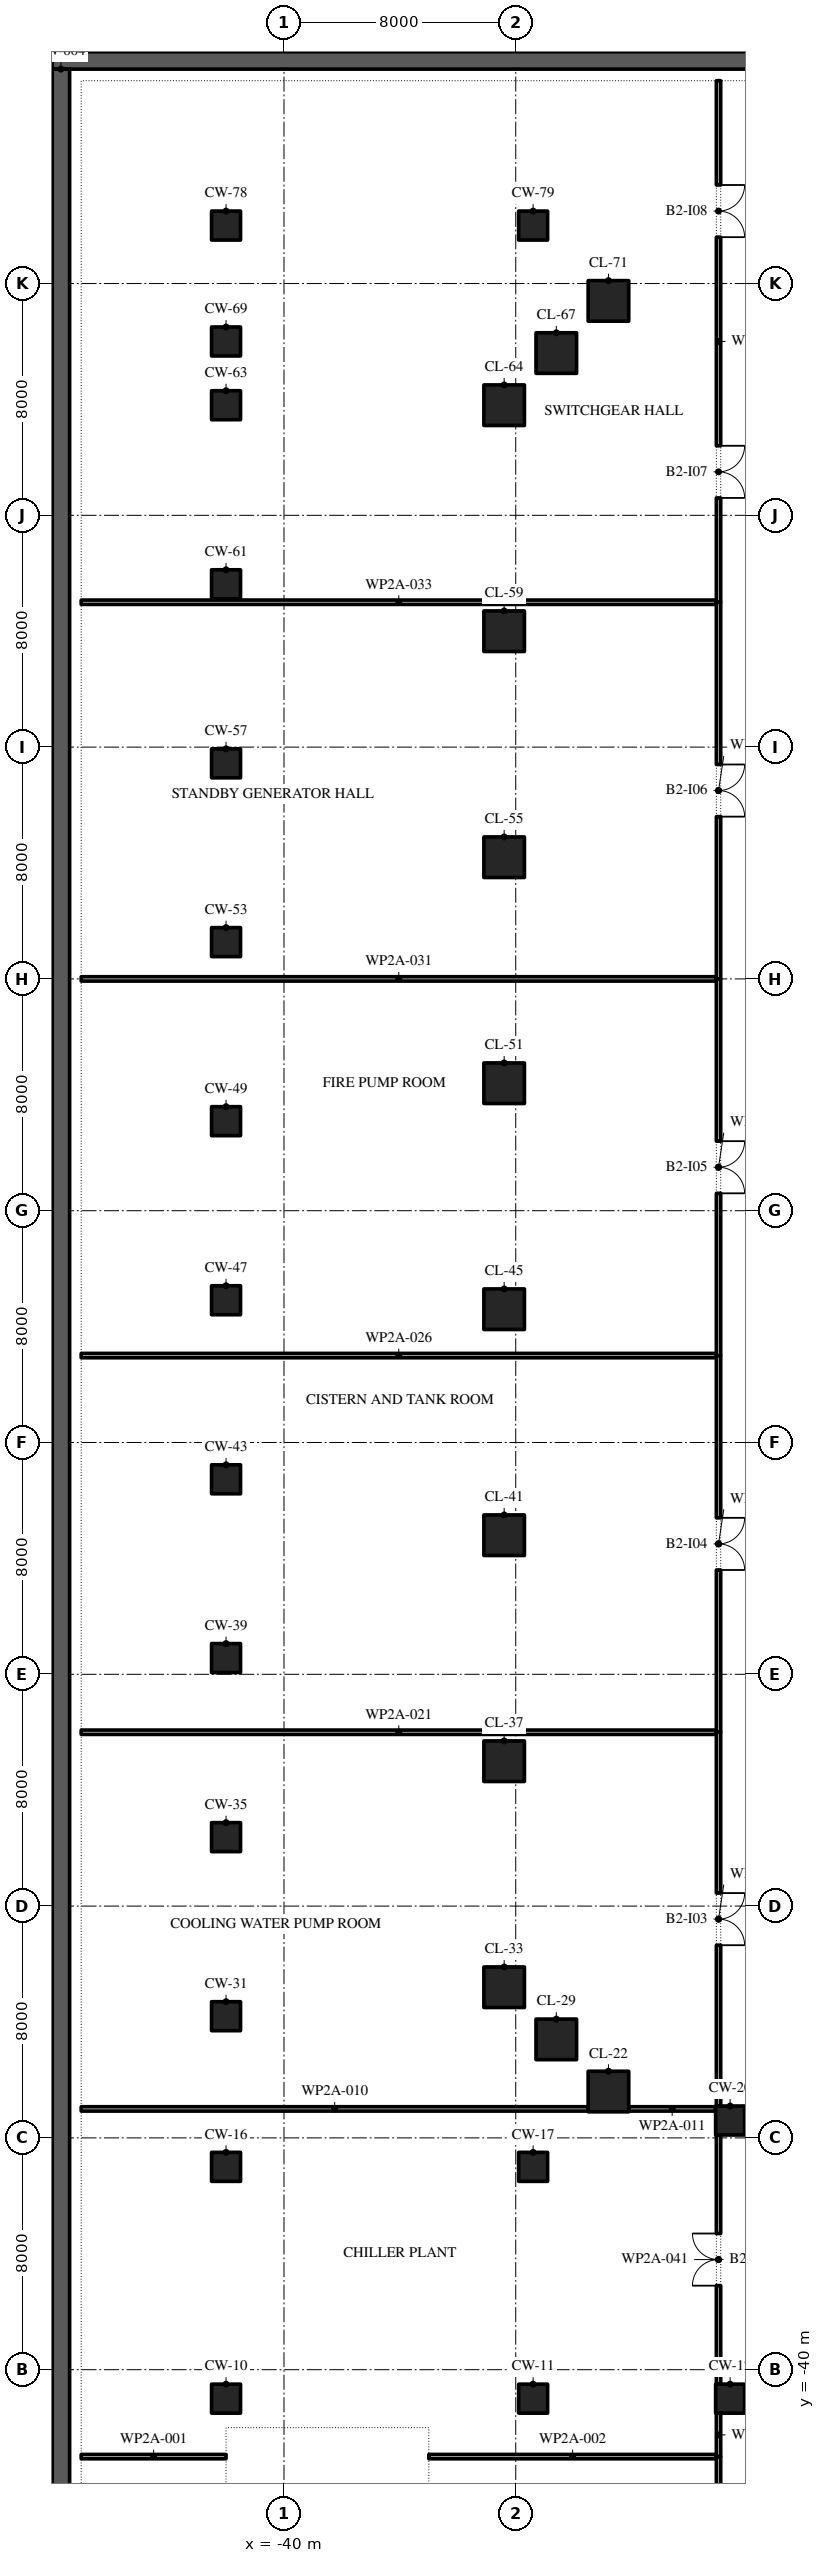
"""IFC4 building model, lengths in metres.
Left out: names, types, materials, properties, quantities, classifications, styles, units other than length and angle.
Written with IfcOpenShell. Run it as: python <this file> out.ifc"""

import sys

from ifc_helpers import new_model, si_unit, direction, frame, frame_2d, origin, origin_2d, place, context, subcontext, project, spatial, rectangle, extrude, element, fill, save


model = new_model("IFC4")
c1 = context("Model", 3, precision=1e-05, world=origin(), true_north=direction((0.0, 1.0)))
c2 = subcontext(c1, "Body", "Model", "MODEL_VIEW")
j1 = project(units=[si_unit("LENGTHUNIT", "METRE"), si_unit("PLANEANGLEUNIT", "RADIAN")], contexts=[c1])
p1 = place(None, origin())
s1 = spatial("IfcSite", under=j1, at=p1, CompositionType="ELEMENT")
p2 = place(p1, origin())
s2 = spatial("IfcBuilding", under=s1, at=p2, CompositionType="ELEMENT")
p3 = place(p2, frame((0.0, 0.0, -10.4)))
s3 = spatial("IfcBuildingStorey", under=s2, at=p3, CompositionType="ELEMENT", Elevation=-10.4)
p4 = place(p3, frame((-48.0, 39.7, -0.3), z_axis=(0.0, 0.0, 1.0), x_axis=(1.0, 0.0, 0.0)))
e1 = element("IfcWall", 1, at=p4, inside=s3, PredefinedType="SOLIDWALL", context=c2, shape_type="SweptSolid", body=[
    extrude(rectangle(XDim=96.0, YDim=0.6, at=frame_2d((48.0, 0.0))), origin(), (0.0, 0.0, 1.0), 5.5),
])
p5 = place(p3, frame((-47.7, -55.4, -0.3), z_axis=(0.0, 0.0, 1.0), x_axis=(0.0, 1.0, 0.0)))
e2 = element("IfcWall", 2, at=p5, inside=s3, PredefinedType="SOLIDWALL", context=c2, shape_type="SweptSolid", body=[
    extrude(rectangle(XDim=94.8, YDim=0.6, at=frame_2d((47.4, 0.0))), origin(), (0.0, 0.0, 1.0), 5.5),
])
for number, where, z_axis, x_axis in (
    (3, (-42.0, -41.0, -0.3), (0.0, 0.0, 1.0), (1.0, 0.0, 0.0)),
    (4, (-31.4, -41.0, -0.3), (0.0, 0.0, 1.0), (1.0, 0.0, 0.0)),
    (5, (-24.6, -41.0, -0.3), (0.0, 0.0, 1.0), (1.0, 0.0, 0.0)),
    (6, (-42.0, -33.0, -0.3), (0.0, 0.0, 1.0), (1.0, 0.0, 0.0)),
    (7, (-31.4, -33.0, -0.3), (0.0, 0.0, 1.0), (1.0, 0.0, 0.0)),
    (8, (-24.6, -31.4, -0.3), (0.0, 0.0, 1.0), (1.0, 0.0, 0.0)),
):
    element("IfcColumn", number, at=place(p3, frame(where, z_axis=z_axis, x_axis=x_axis)), inside=s3, PredefinedType="COLUMN", context=c2, shape_type="SweptSolid", body=[
        extrude(rectangle(XDim=1.0, YDim=1.0, at=origin_2d()), origin(), (0.0, 0.0, 1.0), 5.5),
    ])
for number, where, z_axis, x_axis in (
    (9, (-28.8, -30.4, -0.3), (0.0, 0.0, 1.0), (1.0, 0.0, 0.0)),
    (10, (-30.6, -28.6, -0.3), (0.0, 0.0, 1.0), (1.0, 0.0, 0.0)),
):
    element("IfcColumn", number, at=place(p3, frame(where, z_axis=z_axis, x_axis=x_axis)), inside=s3, PredefinedType="COLUMN", context=c2, shape_type="SweptSolid", body=[
        extrude(rectangle(XDim=1.4, YDim=1.4, at=origin_2d()), origin(), (0.0, 0.0, 1.0), 5.5),
    ])
p6 = place(p3, frame((-42.0, -27.8, -0.3), z_axis=(0.0, 0.0, 1.0), x_axis=(1.0, 0.0, 0.0)))
e11 = element("IfcColumn", 11, at=p6, inside=s3, PredefinedType="COLUMN", context=c2, shape_type="SweptSolid", body=[
    extrude(rectangle(XDim=1.0, YDim=1.0, at=origin_2d()), origin(), (0.0, 0.0, 1.0), 5.5),
])
p7 = place(p3, frame((-32.4, -26.8, -0.3), z_axis=(0.0, 0.0, 1.0), x_axis=(1.0, 0.0, 0.0)))
e12 = element("IfcColumn", 12, at=p7, inside=s3, PredefinedType="COLUMN", context=c2, shape_type="SweptSolid", body=[
    extrude(rectangle(XDim=1.4, YDim=1.4, at=origin_2d()), origin(), (0.0, 0.0, 1.0), 5.5),
])
p8 = place(p3, frame((-42.0, -21.62, -0.3), z_axis=(0.0, 0.0, 1.0), x_axis=(1.0, 0.0, 0.0)))
e13 = element("IfcColumn", 13, at=p8, inside=s3, PredefinedType="COLUMN", context=c2, shape_type="SweptSolid", body=[
    extrude(rectangle(XDim=1.0, YDim=1.0, at=origin_2d()), origin(), (0.0, 0.0, 1.0), 5.5),
])
p9 = place(p3, frame((-32.4, -19.0, -0.3), z_axis=(0.0, 0.0, 1.0), x_axis=(1.0, 0.0, 0.0)))
e14 = element("IfcColumn", 14, at=p9, inside=s3, PredefinedType="COLUMN", context=c2, shape_type="SweptSolid", body=[
    extrude(rectangle(XDim=1.4, YDim=1.4, at=origin_2d()), origin(), (0.0, 0.0, 1.0), 5.5),
])
p10 = place(p3, frame((-42.0, -15.44, -0.3), z_axis=(0.0, 0.0, 1.0), x_axis=(1.0, 0.0, 0.0)))
e15 = element("IfcColumn", 15, at=p10, inside=s3, PredefinedType="COLUMN", context=c2, shape_type="SweptSolid", body=[
    extrude(rectangle(XDim=1.0, YDim=1.0, at=origin_2d()), origin(), (0.0, 0.0, 1.0), 5.5),
])
p11 = place(p3, frame((-32.4, -11.2, -0.3), z_axis=(0.0, 0.0, 1.0), x_axis=(1.0, 0.0, 0.0)))
e16 = element("IfcColumn", 16, at=p11, inside=s3, PredefinedType="COLUMN", context=c2, shape_type="SweptSolid", body=[
    extrude(rectangle(XDim=1.4, YDim=1.4, at=origin_2d()), origin(), (0.0, 0.0, 1.0), 5.5),
])
p12 = place(p3, frame((-42.0, -9.27, -0.3), z_axis=(0.0, 0.0, 1.0), x_axis=(1.0, 0.0, 0.0)))
e17 = element("IfcColumn", 17, at=p12, inside=s3, PredefinedType="COLUMN", context=c2, shape_type="SweptSolid", body=[
    extrude(rectangle(XDim=1.0, YDim=1.0, at=origin_2d()), origin(), (0.0, 0.0, 1.0), 5.5),
])
p13 = place(p3, frame((-32.4, -3.4, -0.3), z_axis=(0.0, 0.0, 1.0), x_axis=(1.0, 0.0, 0.0)))
e18 = element("IfcColumn", 18, at=p13, inside=s3, PredefinedType="COLUMN", context=c2, shape_type="SweptSolid", body=[
    extrude(rectangle(XDim=1.4, YDim=1.4, at=origin_2d()), origin(), (0.0, 0.0, 1.0), 5.5),
])
for number, where, z_axis, x_axis in (
    (19, (-42.0, -3.09, -0.3), (0.0, 0.0, 1.0), (1.0, 0.0, 0.0)),
    (20, (-42.0, 3.09, -0.3), (0.0, 0.0, 1.0), (1.0, 0.0, 0.0)),
):
    element("IfcColumn", number, at=place(p3, frame(where, z_axis=z_axis, x_axis=x_axis)), inside=s3, PredefinedType="COLUMN", context=c2, shape_type="SweptSolid", body=[
        extrude(rectangle(XDim=1.0, YDim=1.0, at=origin_2d()), origin(), (0.0, 0.0, 1.0), 5.5),
    ])
p14 = place(p3, frame((-32.4, 4.4, -0.3), z_axis=(0.0, 0.0, 1.0), x_axis=(1.0, 0.0, 0.0)))
e21 = element("IfcColumn", 21, at=p14, inside=s3, PredefinedType="COLUMN", context=c2, shape_type="SweptSolid", body=[
    extrude(rectangle(XDim=1.4, YDim=1.4, at=origin_2d()), origin(), (0.0, 0.0, 1.0), 5.5),
])
p15 = place(p3, frame((-42.0, 9.27, -0.3), z_axis=(0.0, 0.0, 1.0), x_axis=(1.0, 0.0, 0.0)))
e22 = element("IfcColumn", 22, at=p15, inside=s3, PredefinedType="COLUMN", context=c2, shape_type="SweptSolid", body=[
    extrude(rectangle(XDim=1.0, YDim=1.0, at=origin_2d()), origin(), (0.0, 0.0, 1.0), 5.5),
])
p16 = place(p3, frame((-32.4, 12.2, -0.3), z_axis=(0.0, 0.0, 1.0), x_axis=(1.0, 0.0, 0.0)))
e23 = element("IfcColumn", 23, at=p16, inside=s3, PredefinedType="COLUMN", context=c2, shape_type="SweptSolid", body=[
    extrude(rectangle(XDim=1.4, YDim=1.4, at=origin_2d()), origin(), (0.0, 0.0, 1.0), 5.5),
])
p17 = place(p3, frame((-42.0, 15.44, -0.3), z_axis=(0.0, 0.0, 1.0), x_axis=(1.0, 0.0, 0.0)))
e24 = element("IfcColumn", 24, at=p17, inside=s3, PredefinedType="COLUMN", context=c2, shape_type="SweptSolid", body=[
    extrude(rectangle(XDim=1.0, YDim=1.0, at=origin_2d()), origin(), (0.0, 0.0, 1.0), 5.5),
])
p18 = place(p3, frame((-32.4, 20.0, -0.3), z_axis=(0.0, 0.0, 1.0), x_axis=(1.0, 0.0, 0.0)))
e25 = element("IfcColumn", 25, at=p18, inside=s3, PredefinedType="COLUMN", context=c2, shape_type="SweptSolid", body=[
    extrude(rectangle(XDim=1.4, YDim=1.4, at=origin_2d()), origin(), (0.0, 0.0, 1.0), 5.5),
])
for number, where, z_axis, x_axis in (
    (26, (-42.0, 21.62, -0.3), (0.0, 0.0, 1.0), (1.0, 0.0, 0.0)),
    (27, (-42.0, 27.8, -0.3), (0.0, 0.0, 1.0), (1.0, 0.0, 0.0)),
):
    element("IfcColumn", number, at=place(p3, frame(where, z_axis=z_axis, x_axis=x_axis)), inside=s3, PredefinedType="COLUMN", context=c2, shape_type="SweptSolid", body=[
        extrude(rectangle(XDim=1.0, YDim=1.0, at=origin_2d()), origin(), (0.0, 0.0, 1.0), 5.5),
    ])
for number, where, z_axis, x_axis in (
    (28, (-32.4, 27.8, -0.3), (0.0, 0.0, 1.0), (1.0, 0.0, 0.0)),
    (29, (-30.6, 29.6, -0.3), (0.0, 0.0, 1.0), (1.0, 0.0, 0.0)),
):
    element("IfcColumn", number, at=place(p3, frame(where, z_axis=z_axis, x_axis=x_axis)), inside=s3, PredefinedType="COLUMN", context=c2, shape_type="SweptSolid", body=[
        extrude(rectangle(XDim=1.4, YDim=1.4, at=origin_2d()), origin(), (0.0, 0.0, 1.0), 5.5),
    ])
p19 = place(p3, frame((-42.0, 30.0, -0.3), z_axis=(0.0, 0.0, 1.0), x_axis=(1.0, 0.0, 0.0)))
e30 = element("IfcColumn", 30, at=p19, inside=s3, PredefinedType="COLUMN", context=c2, shape_type="SweptSolid", body=[
    extrude(rectangle(XDim=1.0, YDim=1.0, at=origin_2d()), origin(), (0.0, 0.0, 1.0), 5.5),
])
p20 = place(p3, frame((-28.8, 31.4, -0.3), z_axis=(0.0, 0.0, 1.0), x_axis=(1.0, 0.0, 0.0)))
e31 = element("IfcColumn", 31, at=p20, inside=s3, PredefinedType="COLUMN", context=c2, shape_type="SweptSolid", body=[
    extrude(rectangle(XDim=1.4, YDim=1.4, at=origin_2d()), origin(), (0.0, 0.0, 1.0), 5.5),
])
for number, where, z_axis, x_axis in (
    (32, (-42.0, 34.0, -0.3), (0.0, 0.0, 1.0), (1.0, 0.0, 0.0)),
    (33, (-31.4, 34.0, -0.3), (0.0, 0.0, 1.0), (1.0, 0.0, 0.0)),
):
    element("IfcColumn", number, at=place(p3, frame(where, z_axis=z_axis, x_axis=x_axis)), inside=s3, PredefinedType="COLUMN", context=c2, shape_type="SweptSolid", body=[
        extrude(rectangle(XDim=1.0, YDim=1.0, at=origin_2d()), origin(), (0.0, 0.0, 1.0), 5.5),
    ])
p21 = place(p3, frame((-47.0, -43.0, 0.0), z_axis=(0.0, 0.0, 1.0), x_axis=(1.0, 0.0, 0.0)))
e34 = element("IfcWall", 34, at=p21, inside=s3, PredefinedType="PARTITIONING", context=c2, shape_type="SweptSolid", body=[
    extrude(rectangle(XDim=5.0, YDim=0.15, at=frame_2d((2.5, 0.0))), origin(), (0.0, 0.0, 1.0), 4.9),
])
p22 = place(p3, frame((-35.0, -43.0, 0.0), z_axis=(0.0, 0.0, 1.0), x_axis=(1.0, 0.0, 0.0)))
e35 = element("IfcWall", 35, at=p22, inside=s3, PredefinedType="PARTITIONING", context=c2, shape_type="SweptSolid", body=[
    extrude(rectangle(XDim=9.925, YDim=0.15, at=frame_2d((4.962, 0.0))), origin(), (0.0, 0.0, 1.0), 4.9),
])
p23 = place(p3, frame((-47.0, -31.0, 0.0), z_axis=(0.0, 0.0, 1.0), x_axis=(1.0, 0.0, 0.0)))
e36 = element("IfcWall", 36, at=p23, inside=s3, PredefinedType="PARTITIONING", context=c2, shape_type="SweptSolid", body=[
    extrude(rectangle(XDim=17.5, YDim=0.15, at=frame_2d((8.75, 0.0))), origin(), (0.0, 0.0, 1.0), 4.9),
])
p24 = place(p3, frame((-28.1, -31.0, 0.0), z_axis=(0.0, 0.0, 1.0), x_axis=(1.0, 0.0, 0.0)))
e37 = element("IfcWall", 37, at=p24, inside=s3, PredefinedType="PARTITIONING", context=c2, shape_type="SweptSolid", body=[
    extrude(rectangle(XDim=3.0, YDim=0.15, at=frame_2d((1.5, 0.0))), origin(), (0.0, 0.0, 1.0), 4.9),
])
for number, where, z_axis, x_axis in (
    (38, (-47.0, -18.0, 0.0), (0.0, 0.0, 1.0), (1.0, 0.0, 0.0)),
    (39, (-47.0, -5.0, 0.0), (0.0, 0.0, 1.0), (1.0, 0.0, 0.0)),
    (40, (-47.0, 8.0, 0.0), (0.0, 0.0, 1.0), (1.0, 0.0, 0.0)),
    (41, (-47.0, 21.0, 0.0), (0.0, 0.0, 1.0), (1.0, 0.0, 0.0)),
):
    element("IfcWall", number, at=place(p3, frame(where, z_axis=z_axis, x_axis=x_axis)), inside=s3, PredefinedType="PARTITIONING", context=c2, shape_type="SweptSolid", body=[
        extrude(rectangle(XDim=21.925, YDim=0.15, at=frame_2d((10.962, 0.0))), origin(), (0.0, 0.0, 1.0), 4.9),
    ])
p25 = place(p3, frame((-25.0, -49.5, 0.0), z_axis=(0.0, 0.0, 1.0), x_axis=(0.0, 1.0, 0.0)))
e42 = element("IfcWall", 42, at=p25, inside=s3, PredefinedType="PARTITIONING", context=c2, shape_type="SweptSolid", body=[
    extrude(rectangle(XDim=6.5, YDim=0.15, at=frame_2d((3.25, 0.0))), origin(), (0.0, 0.0, 1.0), 4.9),
])
p26 = place(p25, frame((2.35, 0.0, 0.0)))
e43 = element("IfcOpeningElement", 43, at=p26, cuts=e42, PredefinedType="OPENING", context=c2, shape_type="SweptSolid", body=[
    extrude(rectangle(XDim=1.8, YDim=2.1, at=frame_2d((0.9, 1.05))), frame((0.0, 0.085, 0.0), z_axis=(0.0, -1.0, 0.0), x_axis=(1.0, 0.0, 0.0)), (0.0, 0.0, 1.0), 0.17),
])
p27 = place(p3, frame((-25.0, -43.0, 0.0), z_axis=(0.0, 0.0, 1.0), x_axis=(0.0, 1.0, 0.0)))
e44 = element("IfcWall", 44, at=p27, inside=s3, PredefinedType="PARTITIONING", context=c2, shape_type="SweptSolid", body=[
    extrude(rectangle(XDim=1.5, YDim=0.15, at=frame_2d((0.75, 0.0))), origin(), (0.0, 0.0, 1.0), 4.9),
])
p28 = place(p3, frame((-25.0, -40.5, 0.0), z_axis=(0.0, 0.0, 1.0), x_axis=(0.0, 1.0, 0.0)))
e45 = element("IfcWall", 45, at=p28, inside=s3, PredefinedType="PARTITIONING", context=c2, shape_type="SweptSolid", body=[
    extrude(rectangle(XDim=8.6, YDim=0.15, at=frame_2d((4.3, 0.0))), origin(), (0.0, 0.0, 1.0), 4.9),
])
p29 = place(p28, frame((3.4, 0.0, 0.0)))
e46 = element("IfcOpeningElement", 46, at=p29, cuts=e45, PredefinedType="OPENING", context=c2, shape_type="SweptSolid", body=[
    extrude(rectangle(XDim=1.8, YDim=2.1, at=frame_2d((0.9, 1.05))), frame((0.0, 0.085, 0.0), z_axis=(0.0, -1.0, 0.0), x_axis=(1.0, 0.0, 0.0)), (0.0, 0.0, 1.0), 0.17),
])
p30 = place(p3, frame((-25.0, -30.9, 0.0), z_axis=(0.0, 0.0, 1.0), x_axis=(0.0, 1.0, 0.0)))
e47 = element("IfcWall", 47, at=p30, inside=s3, PredefinedType="PARTITIONING", context=c2, shape_type="SweptSolid", body=[
    extrude(rectangle(XDim=12.9, YDim=0.15, at=frame_2d((6.45, 0.0))), origin(), (0.0, 0.0, 1.0), 4.9),
])
p31 = place(p30, frame((5.55, 0.0, 0.0)))
e48 = element("IfcOpeningElement", 48, at=p31, cuts=e47, PredefinedType="OPENING", context=c2, shape_type="SweptSolid", body=[
    extrude(rectangle(XDim=1.8, YDim=2.1, at=frame_2d((0.9, 1.05))), frame((0.0, 0.085, 0.0), z_axis=(0.0, -1.0, 0.0), x_axis=(1.0, 0.0, 0.0)), (0.0, 0.0, 1.0), 0.17),
])
p32 = place(p3, frame((-25.0, -18.0, 0.0), z_axis=(0.0, 0.0, 1.0), x_axis=(0.0, 1.0, 0.0)))
e49 = element("IfcWall", 49, at=p32, inside=s3, PredefinedType="PARTITIONING", context=c2, shape_type="SweptSolid", body=[
    extrude(rectangle(XDim=13.0, YDim=0.15, at=frame_2d((6.5, 0.0))), origin(), (0.0, 0.0, 1.0), 4.9),
])
p33 = place(p32, frame((5.6, 0.0, 0.0)))
e50 = element("IfcOpeningElement", 50, at=p33, cuts=e49, PredefinedType="OPENING", context=c2, shape_type="SweptSolid", body=[
    extrude(rectangle(XDim=1.8, YDim=2.1, at=frame_2d((0.9, 1.05))), frame((0.0, 0.085, 0.0), z_axis=(0.0, -1.0, 0.0), x_axis=(1.0, 0.0, 0.0)), (0.0, 0.0, 1.0), 0.17),
])
p34 = place(p3, frame((-25.0, -5.0, 0.0), z_axis=(0.0, 0.0, 1.0), x_axis=(0.0, 1.0, 0.0)))
e51 = element("IfcWall", 51, at=p34, inside=s3, PredefinedType="PARTITIONING", context=c2, shape_type="SweptSolid", body=[
    extrude(rectangle(XDim=13.0, YDim=0.15, at=frame_2d((6.5, 0.0))), origin(), (0.0, 0.0, 1.0), 4.9),
])
p35 = place(p34, frame((5.6, 0.0, 0.0)))
e52 = element("IfcOpeningElement", 52, at=p35, cuts=e51, PredefinedType="OPENING", context=c2, shape_type="SweptSolid", body=[
    extrude(rectangle(XDim=1.8, YDim=2.1, at=frame_2d((0.9, 1.05))), frame((0.0, 0.085, 0.0), z_axis=(0.0, -1.0, 0.0), x_axis=(1.0, 0.0, 0.0)), (0.0, 0.0, 1.0), 0.17),
])
p36 = place(p3, frame((-25.0, 8.0, 0.0), z_axis=(0.0, 0.0, 1.0), x_axis=(0.0, 1.0, 0.0)))
e53 = element("IfcWall", 53, at=p36, inside=s3, PredefinedType="PARTITIONING", context=c2, shape_type="SweptSolid", body=[
    extrude(rectangle(XDim=13.0, YDim=0.15, at=frame_2d((6.5, 0.0))), origin(), (0.0, 0.0, 1.0), 4.9),
])
p37 = place(p36, frame((5.6, 0.0, 0.0)))
e54 = element("IfcOpeningElement", 54, at=p37, cuts=e53, PredefinedType="OPENING", context=c2, shape_type="SweptSolid", body=[
    extrude(rectangle(XDim=1.8, YDim=2.1, at=frame_2d((0.9, 1.05))), frame((0.0, 0.085, 0.0), z_axis=(0.0, -1.0, 0.0), x_axis=(1.0, 0.0, 0.0)), (0.0, 0.0, 1.0), 0.17),
])
p38 = place(p3, frame((-25.0, 21.0, 0.0), z_axis=(0.0, 0.0, 1.0), x_axis=(0.0, 1.0, 0.0)))
e55 = element("IfcWall", 55, at=p38, inside=s3, PredefinedType="PARTITIONING", context=c2, shape_type="SweptSolid", body=[
    extrude(rectangle(XDim=18.0, YDim=0.15, at=frame_2d((9.0, 0.0))), origin(), (0.0, 0.0, 1.0), 4.9),
])
p39 = place(p38, frame((3.6, 0.0, 0.0)))
e56 = element("IfcOpeningElement", 56, at=p39, cuts=e55, PredefinedType="OPENING", context=c2, shape_type="SweptSolid", body=[
    extrude(rectangle(XDim=1.8, YDim=2.1, at=frame_2d((0.9, 1.05))), frame((0.0, 0.085, 0.0), z_axis=(0.0, -1.0, 0.0), x_axis=(1.0, 0.0, 0.0)), (0.0, 0.0, 1.0), 0.17),
])
p40 = place(p38, frame((12.6, 0.0, 0.0)))
e57 = element("IfcOpeningElement", 57, at=p40, cuts=e55, PredefinedType="OPENING", context=c2, shape_type="SweptSolid", body=[
    extrude(rectangle(XDim=1.8, YDim=2.1, at=frame_2d((0.9, 1.05))), frame((0.0, 0.085, 0.0), z_axis=(0.0, -1.0, 0.0), x_axis=(1.0, 0.0, 0.0)), (0.0, 0.0, 1.0), 0.17),
])
p41 = place(p29, origin())
e58 = element("IfcDoor", 58, at=p41, inside=s3, OperationType="SINGLE_SWING_LEFT", PredefinedType="DOOR", context=c2, shape_type="SweptSolid", body=[
    extrude(rectangle(XDim=1.8, YDim=2.1, at=frame_2d((0.9, 1.05))), frame((0.0, 0.025, 0.0), z_axis=(0.0, -1.0, 0.0), x_axis=(1.0, 0.0, 0.0)), (0.0, 0.0, 1.0), 0.05),
])
fill(e46, e58)
p42 = place(p31, frame((1.8, 0.0, 0.0), z_axis=(0.0, 0.0, 1.0), x_axis=(-1.0, 0.0, 0.0)))
e59 = element("IfcDoor", 59, at=p42, inside=s3, OperationType="SINGLE_SWING_RIGHT", PredefinedType="DOOR", context=c2, shape_type="SweptSolid", body=[
    extrude(rectangle(XDim=1.8, YDim=2.1, at=frame_2d((0.9, 1.05))), frame((0.0, 0.025, 0.0), z_axis=(0.0, -1.0, 0.0), x_axis=(1.0, 0.0, 0.0)), (0.0, 0.0, 1.0), 0.05),
])
fill(e48, e59)
p43 = place(p33, frame((1.8, 0.0, 0.0), z_axis=(0.0, 0.0, 1.0), x_axis=(-1.0, 0.0, 0.0)))
e60 = element("IfcDoor", 60, at=p43, inside=s3, OperationType="SINGLE_SWING_LEFT", PredefinedType="DOOR", context=c2, shape_type="SweptSolid", body=[
    extrude(rectangle(XDim=1.8, YDim=2.1, at=frame_2d((0.9, 1.05))), frame((0.0, 0.025, 0.0), z_axis=(0.0, -1.0, 0.0), x_axis=(1.0, 0.0, 0.0)), (0.0, 0.0, 1.0), 0.05),
])
fill(e50, e60)
p44 = place(p35, frame((1.8, 0.0, 0.0), z_axis=(0.0, 0.0, 1.0), x_axis=(-1.0, 0.0, 0.0)))
e61 = element("IfcDoor", 61, at=p44, inside=s3, OperationType="SINGLE_SWING_LEFT", PredefinedType="DOOR", context=c2, shape_type="SweptSolid", body=[
    extrude(rectangle(XDim=1.8, YDim=2.1, at=frame_2d((0.9, 1.05))), frame((0.0, 0.025, 0.0), z_axis=(0.0, -1.0, 0.0), x_axis=(1.0, 0.0, 0.0)), (0.0, 0.0, 1.0), 0.05),
])
fill(e52, e61)
p45 = place(p37, frame((1.8, 0.0, 0.0), z_axis=(0.0, 0.0, 1.0), x_axis=(-1.0, 0.0, 0.0)))
e62 = element("IfcDoor", 62, at=p45, inside=s3, OperationType="SINGLE_SWING_LEFT", PredefinedType="DOOR", context=c2, shape_type="SweptSolid", body=[
    extrude(rectangle(XDim=1.8, YDim=2.1, at=frame_2d((0.9, 1.05))), frame((0.0, 0.025, 0.0), z_axis=(0.0, -1.0, 0.0), x_axis=(1.0, 0.0, 0.0)), (0.0, 0.0, 1.0), 0.05),
])
fill(e54, e62)
p46 = place(p39, frame((1.8, 0.0, 0.0), z_axis=(0.0, 0.0, 1.0), x_axis=(-1.0, 0.0, 0.0)))
e63 = element("IfcDoor", 63, at=p46, inside=s3, OperationType="SINGLE_SWING_LEFT", PredefinedType="DOOR", context=c2, shape_type="SweptSolid", body=[
    extrude(rectangle(XDim=1.8, YDim=2.1, at=frame_2d((0.9, 1.05))), frame((0.0, 0.025, 0.0), z_axis=(0.0, -1.0, 0.0), x_axis=(1.0, 0.0, 0.0)), (0.0, 0.0, 1.0), 0.05),
])
fill(e56, e63)
p47 = place(p40, frame((1.8, 0.0, 0.0), z_axis=(0.0, 0.0, 1.0), x_axis=(-1.0, 0.0, 0.0)))
e64 = element("IfcDoor", 64, at=p47, inside=s3, OperationType="SINGLE_SWING_RIGHT", PredefinedType="DOOR", context=c2, shape_type="SweptSolid", body=[
    extrude(rectangle(XDim=1.8, YDim=2.1, at=frame_2d((0.9, 1.05))), frame((0.0, 0.025, 0.0), z_axis=(0.0, -1.0, 0.0), x_axis=(1.0, 0.0, 0.0)), (0.0, 0.0, 1.0), 0.05),
])
fill(e57, e64)
save(model, sys.argv[1])
